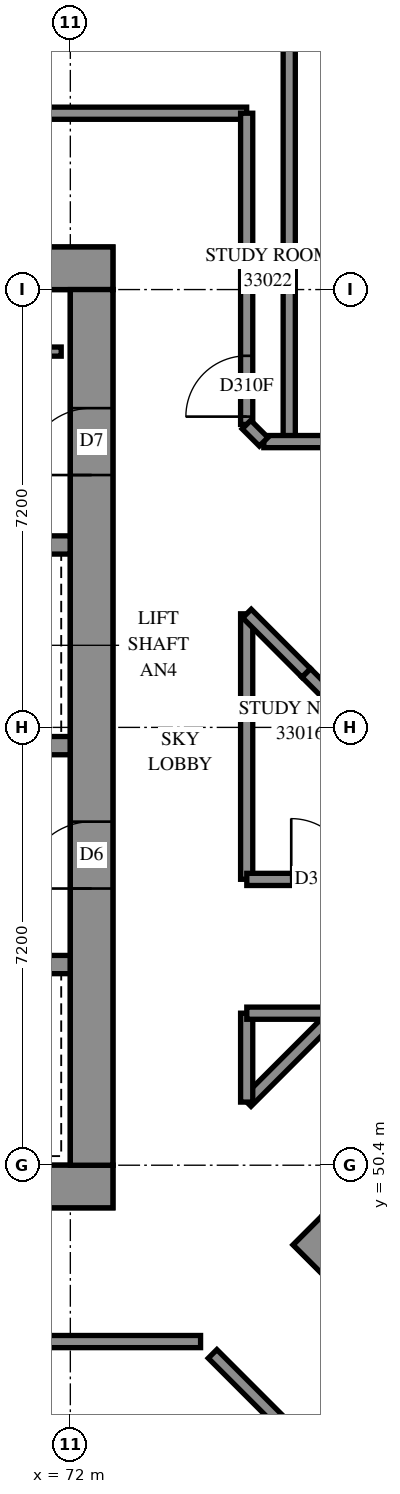
"""IFC4 building model, lengths in metres.
Left out: names, types, materials, properties, quantities, classifications, styles, units other than length and angle.
Written with IfcOpenShell. Run it as: python <this file> out.ifc"""

import sys

from ifc_helpers import new_model, si_unit, direction, frame, frame_2d, origin, place, context, subcontext, project, spatial, rectangle, extrude, element, fill, save


model = new_model("IFC4")
c1 = context("Model", 3, precision=1e-05, world=origin(), true_north=direction((0.0, 1.0)))
c2 = subcontext(c1, "Body", "Model", "MODEL_VIEW")
j1 = project(units=[si_unit("LENGTHUNIT", "METRE"), si_unit("PLANEANGLEUNIT", "RADIAN")], contexts=[c1])
p1 = place(None, origin())
s1 = spatial("IfcSite", under=j1, at=p1, CompositionType="ELEMENT")
p2 = place(p1, origin())
s2 = spatial("IfcBuilding", under=s1, at=p2, CompositionType="ELEMENT")
p3 = place(p2, frame((0.0, 0.0, 122.0)))
s3 = spatial("IfcBuildingStorey", under=s2, at=p3, CompositionType="ELEMENT", Elevation=122.0)
p4 = place(p3, frame((56.9, 50.05, -0.3), z_axis=(0.0, 0.0, 1.0), x_axis=(1.0, 0.0, 0.0)))
e1 = element("IfcWall", 1, at=p4, inside=s3, PredefinedType="SHEAR", context=c2, shape_type="SweptSolid", body=[
    extrude(rectangle(XDim=15.8, YDim=0.7, at=frame_2d((7.9, 0.0))), origin(), (0.0, 0.0, 1.0), 3.5),
])
p5 = place(p3, frame((56.9, 65.15, -0.3), z_axis=(0.0, 0.0, 1.0), x_axis=(1.0, 0.0, 0.0)))
e2 = element("IfcWall", 2, at=p5, inside=s3, PredefinedType="SHEAR", context=c2, shape_type="SweptSolid", body=[
    extrude(rectangle(XDim=15.8, YDim=0.7, at=frame_2d((7.9, 0.0))), origin(), (0.0, 0.0, 1.0), 3.5),
])
p6 = place(p5, frame((10.7, 0.0, 0.3)))
e3 = element("IfcOpeningElement", 3, at=p6, cuts=e2, PredefinedType="OPENING", context=c2, shape_type="SweptSolid", body=[
    extrude(rectangle(XDim=0.8, YDim=2.1, at=frame_2d((0.4, 1.05))), frame((0.0, 0.36, 0.0), z_axis=(0.0, -1.0, 0.0), x_axis=(1.0, 0.0, 0.0)), (0.0, 0.0, 1.0), 0.72),
])
p7 = place(p3, frame((72.35, 50.4, -0.3), z_axis=(0.0, 0.0, 1.0), x_axis=(0.0, 1.0, 0.0)))
e4 = element("IfcWall", 4, at=p7, inside=s3, PredefinedType="SHEAR", context=c2, shape_type="SweptSolid", body=[
    extrude(rectangle(XDim=14.4, YDim=0.7, at=frame_2d((7.2, 0.0))), origin(), (0.0, 0.0, 1.0), 3.5),
])
p8 = place(p7, frame((4.55, 0.0, 0.3)))
e5 = element("IfcOpeningElement", 5, at=p8, cuts=e4, PredefinedType="OPENING", context=c2, shape_type="SweptSolid", body=[
    extrude(rectangle(XDim=1.1, YDim=2.1, at=frame_2d((0.55, 1.05))), frame((0.0, 0.36, 0.0), z_axis=(0.0, -1.0, 0.0), x_axis=(1.0, 0.0, 0.0)), (0.0, 0.0, 1.0), 0.72),
])
p9 = place(p7, frame((11.35, 0.0, 0.3)))
e6 = element("IfcOpeningElement", 6, at=p9, cuts=e4, PredefinedType="OPENING", context=c2, shape_type="SweptSolid", body=[
    extrude(rectangle(XDim=1.1, YDim=2.1, at=frame_2d((0.55, 1.05))), frame((0.0, 0.36, 0.0), z_axis=(0.0, -1.0, 0.0), x_axis=(1.0, 0.0, 0.0)), (0.0, 0.0, 1.0), 0.72),
])
p10 = place(p3, frame((57.6, 53.7, 0.0), z_axis=(0.0, 0.0, 1.0), x_axis=(1.0, 0.0, 0.0)))
e7 = element("IfcWall", 7, at=p10, inside=s3, PredefinedType="SOLIDWALL", context=c2, shape_type="SweptSolid", body=[
    extrude(rectangle(XDim=14.4, YDim=0.3, at=frame_2d((7.2, 0.0))), origin(), (0.0, 0.0, 1.0), 3.9),
])
p11 = place(p10, frame((1.25, 0.0, 0.0)))
e8 = element("IfcOpeningElement", 8, at=p11, cuts=e7, PredefinedType="OPENING", context=c2, shape_type="SweptSolid", body=[
    extrude(rectangle(XDim=1.1, YDim=2.1, at=frame_2d((0.55, 1.05))), frame((0.0, 0.16, 0.0), z_axis=(0.0, -1.0, 0.0), x_axis=(1.0, 0.0, 0.0)), (0.0, 0.0, 1.0), 0.32),
])
p12 = place(p10, frame((4.85, 0.0, 0.0)))
e9 = element("IfcOpeningElement", 9, at=p12, cuts=e7, PredefinedType="OPENING", context=c2, shape_type="SweptSolid", body=[
    extrude(rectangle(XDim=1.1, YDim=2.1, at=frame_2d((0.55, 1.05))), frame((0.0, 0.16, 0.0), z_axis=(0.0, -1.0, 0.0), x_axis=(1.0, 0.0, 0.0)), (0.0, 0.0, 1.0), 0.32),
])
p13 = place(p10, frame((8.45, 0.0, 0.0)))
e10 = element("IfcOpeningElement", 10, at=p13, cuts=e7, PredefinedType="OPENING", context=c2, shape_type="SweptSolid", body=[
    extrude(rectangle(XDim=1.1, YDim=2.1, at=frame_2d((0.55, 1.05))), frame((0.0, 0.16, 0.0), z_axis=(0.0, -1.0, 0.0), x_axis=(1.0, 0.0, 0.0)), (0.0, 0.0, 1.0), 0.32),
])
p14 = place(p10, frame((12.05, 0.0, 0.0)))
e11 = element("IfcOpeningElement", 11, at=p14, cuts=e7, PredefinedType="OPENING", context=c2, shape_type="SweptSolid", body=[
    extrude(rectangle(XDim=1.1, YDim=2.1, at=frame_2d((0.55, 1.05))), frame((0.0, 0.16, 0.0), z_axis=(0.0, -1.0, 0.0), x_axis=(1.0, 0.0, 0.0)), (0.0, 0.0, 1.0), 0.32),
])
p15 = place(p3, frame((57.6, 57.3, 0.0), z_axis=(0.0, 0.0, 1.0), x_axis=(1.0, 0.0, 0.0)))
e12 = element("IfcWall", 12, at=p15, inside=s3, PredefinedType="SOLIDWALL", context=c2, shape_type="SweptSolid", body=[
    extrude(rectangle(XDim=14.4, YDim=0.3, at=frame_2d((7.2, 0.0))), origin(), (0.0, 0.0, 1.0), 3.9),
])
p16 = place(p15, frame((12.05, 0.0, 0.0)))
e13 = element("IfcOpeningElement", 13, at=p16, cuts=e12, PredefinedType="OPENING", context=c2, shape_type="SweptSolid", body=[
    extrude(rectangle(XDim=1.1, YDim=2.1, at=frame_2d((0.55, 1.05))), frame((0.0, 0.16, 0.0), z_axis=(0.0, -1.0, 0.0), x_axis=(1.0, 0.0, 0.0)), (0.0, 0.0, 1.0), 0.32),
])
p17 = place(p3, frame((64.8, 60.6, 0.0), z_axis=(0.0, 0.0, 1.0), x_axis=(1.0, 0.0, 0.0)))
e14 = element("IfcWall", 14, at=p17, inside=s3, PredefinedType="SOLIDWALL", context=c2, shape_type="SweptSolid", body=[
    extrude(rectangle(XDim=7.2, YDim=0.3, at=frame_2d((3.6, 0.0))), origin(), (0.0, 0.0, 1.0), 3.9),
])
p18 = place(p3, frame((75.912, 49.337, -0.3), z_axis=(0.0, 0.0, 1.0), x_axis=(0.7071036166, -0.7071099457, 0.0)))
e15 = element("IfcWall", 15, at=p18, inside=s3, PredefinedType="SHEAR", context=c2, shape_type="SweptSolid", body=[
    extrude(rectangle(XDim=15.8, YDim=0.7, at=frame_2d((7.9, 0.0))), origin(), (0.0, 0.0, 1.0), 3.5),
])
p19 = place(p3, frame((82.191, 67.996, 0.0), z_axis=(0.0, 0.0, 1.0), x_axis=(-0.9328115226, 0.3603646254, 0.0)))
e16 = element("IfcWall", 16, at=p19, inside=s3, PredefinedType="SOLIDWALL", context=c2, shape_type="SweptSolid", body=[
    extrude(rectangle(XDim=8.674, YDim=0.8, at=frame_2d((4.337, 0.0))), origin(), (0.0, 0.0, 1.0), 0.65),
])
p20 = place(p3, frame((64.95, 63.78, 0.0), z_axis=(0.0, 0.0, 1.0), x_axis=(1.0, 0.0, 0.0)))
e17 = element("IfcWall", 17, at=p20, inside=s3, PredefinedType="PARTITIONING", context=c2, shape_type="SweptSolid", body=[
    extrude(rectangle(XDim=6.9, YDim=0.15, at=frame_2d((3.45, 0.0))), origin(), (0.0, 0.0, 1.0), 3.9),
])
p21 = place(p3, frame((54.7, 67.7, 0.0), z_axis=(0.0, 0.0, 1.0), x_axis=(1.0, 0.0, 0.0)))
e18 = element("IfcWall", 18, at=p21, inside=s3, PredefinedType="PARTITIONING", context=c2, shape_type="SweptSolid", body=[
    extrude(rectangle(XDim=20.2, YDim=0.2, at=frame_2d((10.1, 0.0))), origin(), (0.0, 0.0, 1.0), 3.9),
])
p22 = place(p21, frame((8.838, 0.0, 0.0)))
e19 = element("IfcOpeningElement", 19, at=p22, cuts=e18, PredefinedType="OPENING", context=c2, shape_type="SweptSolid", body=[
    extrude(rectangle(XDim=1.0, YDim=2.1, at=frame_2d((0.5, 1.05))), frame((0.0, 0.11, 0.0), z_axis=(0.0, -1.0, 0.0), x_axis=(1.0, 0.0, 0.0)), (0.0, 0.0, 1.0), 0.22),
])
p23 = place(p3, frame((54.7, 47.5, 0.0), z_axis=(0.0, 0.0, 1.0), x_axis=(1.0, 0.0, 0.0)))
e20 = element("IfcWall", 20, at=p23, inside=s3, PredefinedType="PARTITIONING", context=c2, shape_type="SweptSolid", body=[
    extrude(rectangle(XDim=19.442, YDim=0.2, at=frame_2d((9.721, 0.0))), origin(), (0.0, 0.0, 1.0), 3.9),
])
p24 = place(p23, frame((12.444, 0.0, 0.0)))
e21 = element("IfcOpeningElement", 21, at=p24, cuts=e20, PredefinedType="OPENING", context=c2, shape_type="SweptSolid", body=[
    extrude(rectangle(XDim=1.0, YDim=2.1, at=frame_2d((0.5, 1.05))), frame((0.0, 0.11, 0.0), z_axis=(0.0, -1.0, 0.0), x_axis=(1.0, 0.0, 0.0)), (0.0, 0.0, 1.0), 0.22),
])
p25 = place(p3, frame((75.6, 62.3, 0.0), z_axis=(0.0, 0.0, 1.0), x_axis=(0.0, 1.0, 0.0)))
e22 = element("IfcWall", 22, at=p25, inside=s3, PredefinedType="PARTITIONING", context=c2, shape_type="SweptSolid", body=[
    extrude(rectangle(XDim=7.17, YDim=0.2, at=frame_2d((3.585, 0.0))), origin(), (0.0, 0.0, 1.0), 3.9),
])
p26 = place(p3, frame((74.9, 62.582, 0.0), z_axis=(0.0, 0.0, 1.0), x_axis=(0.0, 1.0, 0.0)))
e23 = element("IfcWall", 23, at=p26, inside=s3, PredefinedType="PARTITIONING", context=c2, shape_type="SweptSolid", body=[
    extrude(rectangle(XDim=5.118, YDim=0.2, at=frame_2d((2.559, 0.0))), origin(), (0.0, 0.0, 1.0), 3.9),
])
p27 = place(p26, frame((0.129, 0.0, 0.0)))
e24 = element("IfcOpeningElement", 24, at=p27, cuts=e23, PredefinedType="OPENING", context=c2, shape_type="SweptSolid", body=[
    extrude(rectangle(XDim=1.0, YDim=2.1, at=frame_2d((0.5, 1.05))), frame((0.0, 0.11, 0.0), z_axis=(0.0, -1.0, 0.0), x_axis=(1.0, 0.0, 0.0)), (0.0, 0.0, 1.0), 0.22),
])
p28 = place(p3, frame((74.9, 55.102, 0.0), z_axis=(0.0, 0.0, 1.0), x_axis=(0.0, 1.0, 0.0)))
e25 = element("IfcWall", 25, at=p28, inside=s3, PredefinedType="PARTITIONING", context=c2, shape_type="SweptSolid", body=[
    extrude(rectangle(XDim=4.366, YDim=0.2, at=frame_2d((2.183, 0.0))), origin(), (0.0, 0.0, 1.0), 3.9),
])
p29 = place(p3, frame((75.182, 62.3, 0.0), z_axis=(0.0, 0.0, 1.0), x_axis=(1.0, 0.0, 0.0)))
e26 = element("IfcWall", 26, at=p29, inside=s3, PredefinedType="PARTITIONING", context=c2, shape_type="SweptSolid", body=[
    extrude(rectangle(XDim=4.018, YDim=0.2, at=frame_2d((2.009, 0.0))), origin(), (0.0, 0.0, 1.0), 3.9),
])
p30 = place(p3, frame((74.902, 55.1, 0.0), z_axis=(0.0, 0.0, 1.0), x_axis=(1.0, 0.0, 0.0)))
e27 = element("IfcWall", 27, at=p30, inside=s3, PredefinedType="PARTITIONING", context=c2, shape_type="SweptSolid", body=[
    extrude(rectangle(XDim=3.662, YDim=0.2, at=frame_2d((1.831, 0.0))), origin(), (0.0, 0.0, 1.0), 3.9),
])
p31 = place(p30, frame((0.731, 0.0, 0.0)))
e28 = element("IfcOpeningElement", 28, at=p31, cuts=e27, PredefinedType="OPENING", context=c2, shape_type="SweptSolid", body=[
    extrude(rectangle(XDim=1.0, YDim=2.1, at=frame_2d((0.5, 1.05))), frame((0.0, 0.11, 0.0), z_axis=(0.0, -1.0, 0.0), x_axis=(1.0, 0.0, 0.0)), (0.0, 0.0, 1.0), 0.22),
])
p32 = place(p3, frame((75.879, 58.497, 0.0), z_axis=(0.0, 0.0, 1.0), x_axis=(0.7075561657, -0.7066571109, 0.0)))
e29 = element("IfcWall", 29, at=p32, inside=s3, PredefinedType="PARTITIONING", context=c2, shape_type="SweptSolid", body=[
    extrude(rectangle(XDim=2.225, YDim=0.2, at=frame_2d((1.112, 0.0))), origin(), (0.0, 0.0, 1.0), 3.9),
])
p33 = place(p3, frame((74.339, 47.297, 0.0), z_axis=(0.0, 0.0, 1.0), x_axis=(0.7071067812, -0.7071067812, 0.0)))
e30 = element("IfcWall", 30, at=p33, inside=s3, PredefinedType="PARTITIONING", context=c2, shape_type="SweptSolid", body=[
    extrude(rectangle(XDim=2.22, YDim=0.2, at=frame_2d((1.11, 0.0))), origin(), (0.0, 0.0, 1.0), 3.9),
])
p34 = place(p3, frame((74.901, 51.439, 0.0), z_axis=(0.0, 0.0, 1.0), x_axis=(0.7071067812, 0.7071067812, 0.0)))
e31 = element("IfcWall", 31, at=p34, inside=s3, PredefinedType="PARTITIONING", context=c2, shape_type="SweptSolid", body=[
    extrude(rectangle(XDim=2.065, YDim=0.2, at=frame_2d((1.032, 0.0))), origin(), (0.0, 0.0, 1.0), 3.9),
])
p35 = place(p3, frame((74.9, 51.438, 0.0), z_axis=(0.0, 0.0, 1.0), x_axis=(0.0, 1.0, 0.0)))
e32 = element("IfcWall", 32, at=p35, inside=s3, PredefinedType="PARTITIONING", context=c2, shape_type="SweptSolid", body=[
    extrude(rectangle(XDim=1.462, YDim=0.2, at=frame_2d((0.731, 0.0))), origin(), (0.0, 0.0, 1.0), 3.9),
])
p36 = place(p3, frame((74.902, 52.9, 0.0), z_axis=(0.0, 0.0, 1.0), x_axis=(1.0, 0.0, 0.0)))
e33 = element("IfcWall", 33, at=p36, inside=s3, PredefinedType="PARTITIONING", context=c2, shape_type="SweptSolid", body=[
    extrude(rectangle(XDim=1.46, YDim=0.2, at=frame_2d((0.73, 0.0))), origin(), (0.0, 0.0, 1.0), 3.9),
])
p37 = place(p3, frame((74.904, 59.472, 0.0), z_axis=(0.0, 0.0, 1.0), x_axis=(0.7063811719, -0.7078316466, 0.0)))
e34 = element("IfcWall", 34, at=p37, inside=s3, PredefinedType="PARTITIONING", context=c2, shape_type="SweptSolid", body=[
    extrude(rectangle(XDim=1.379, YDim=0.2, at=frame_2d((0.69, 0.0))), origin(), (0.0, 0.0, 1.0), 3.9),
])
p38 = place(p3, frame((74.897, 62.579, 0.0), z_axis=(0.0, 0.0, 1.0), x_axis=(0.7071067812, -0.7071067812, 0.0)))
e35 = element("IfcWall", 35, at=p38, inside=s3, PredefinedType="PARTITIONING", context=c2, shape_type="SweptSolid", body=[
    extrude(rectangle(XDim=0.399, YDim=0.2, at=frame_2d((0.199, 0.0))), origin(), (0.0, 0.0, 1.0), 3.9),
])
p39 = place(p8, origin())
e36 = element("IfcDoor", 36, at=p39, inside=s3, OperationType="DOUBLE_DOOR_SINGLE_SWING", PredefinedType="DOOR", context=c2, shape_type="SweptSolid", body=[
    extrude(rectangle(XDim=1.1, YDim=2.1, at=frame_2d((0.55, 1.05))), frame((0.0, 0.025, 0.0), z_axis=(0.0, -1.0, 0.0), x_axis=(1.0, 0.0, 0.0)), (0.0, 0.0, 1.0), 0.05),
])
fill(e5, e36)
p40 = place(p9, origin())
e37 = element("IfcDoor", 37, at=p40, inside=s3, OperationType="SINGLE_SWING_RIGHT", PredefinedType="DOOR", context=c2, shape_type="SweptSolid", body=[
    extrude(rectangle(XDim=1.1, YDim=2.1, at=frame_2d((0.55, 1.05))), frame((0.0, 0.025, 0.0), z_axis=(0.0, -1.0, 0.0), x_axis=(1.0, 0.0, 0.0)), (0.0, 0.0, 1.0), 0.05),
])
fill(e6, e37)
p41 = place(p31, origin())
e38 = element("IfcDoor", 38, at=p41, inside=s3, OperationType="SINGLE_SWING_LEFT", PredefinedType="DOOR", context=c2, shape_type="SweptSolid", body=[
    extrude(rectangle(XDim=1.0, YDim=2.1, at=frame_2d((0.5, 1.05))), frame((0.0, 0.025, 0.0), z_axis=(0.0, -1.0, 0.0), x_axis=(1.0, 0.0, 0.0)), (0.0, 0.0, 1.0), 0.05),
])
fill(e28, e38)
p42 = place(p27, origin())
e39 = element("IfcDoor", 39, at=p42, inside=s3, OperationType="SINGLE_SWING_LEFT", PredefinedType="DOOR", context=c2, shape_type="SweptSolid", body=[
    extrude(rectangle(XDim=1.0, YDim=2.1, at=frame_2d((0.5, 1.05))), frame((0.0, 0.025, 0.0), z_axis=(0.0, -1.0, 0.0), x_axis=(1.0, 0.0, 0.0)), (0.0, 0.0, 1.0), 0.05),
])
fill(e24, e39)
save(model, sys.argv[1])
